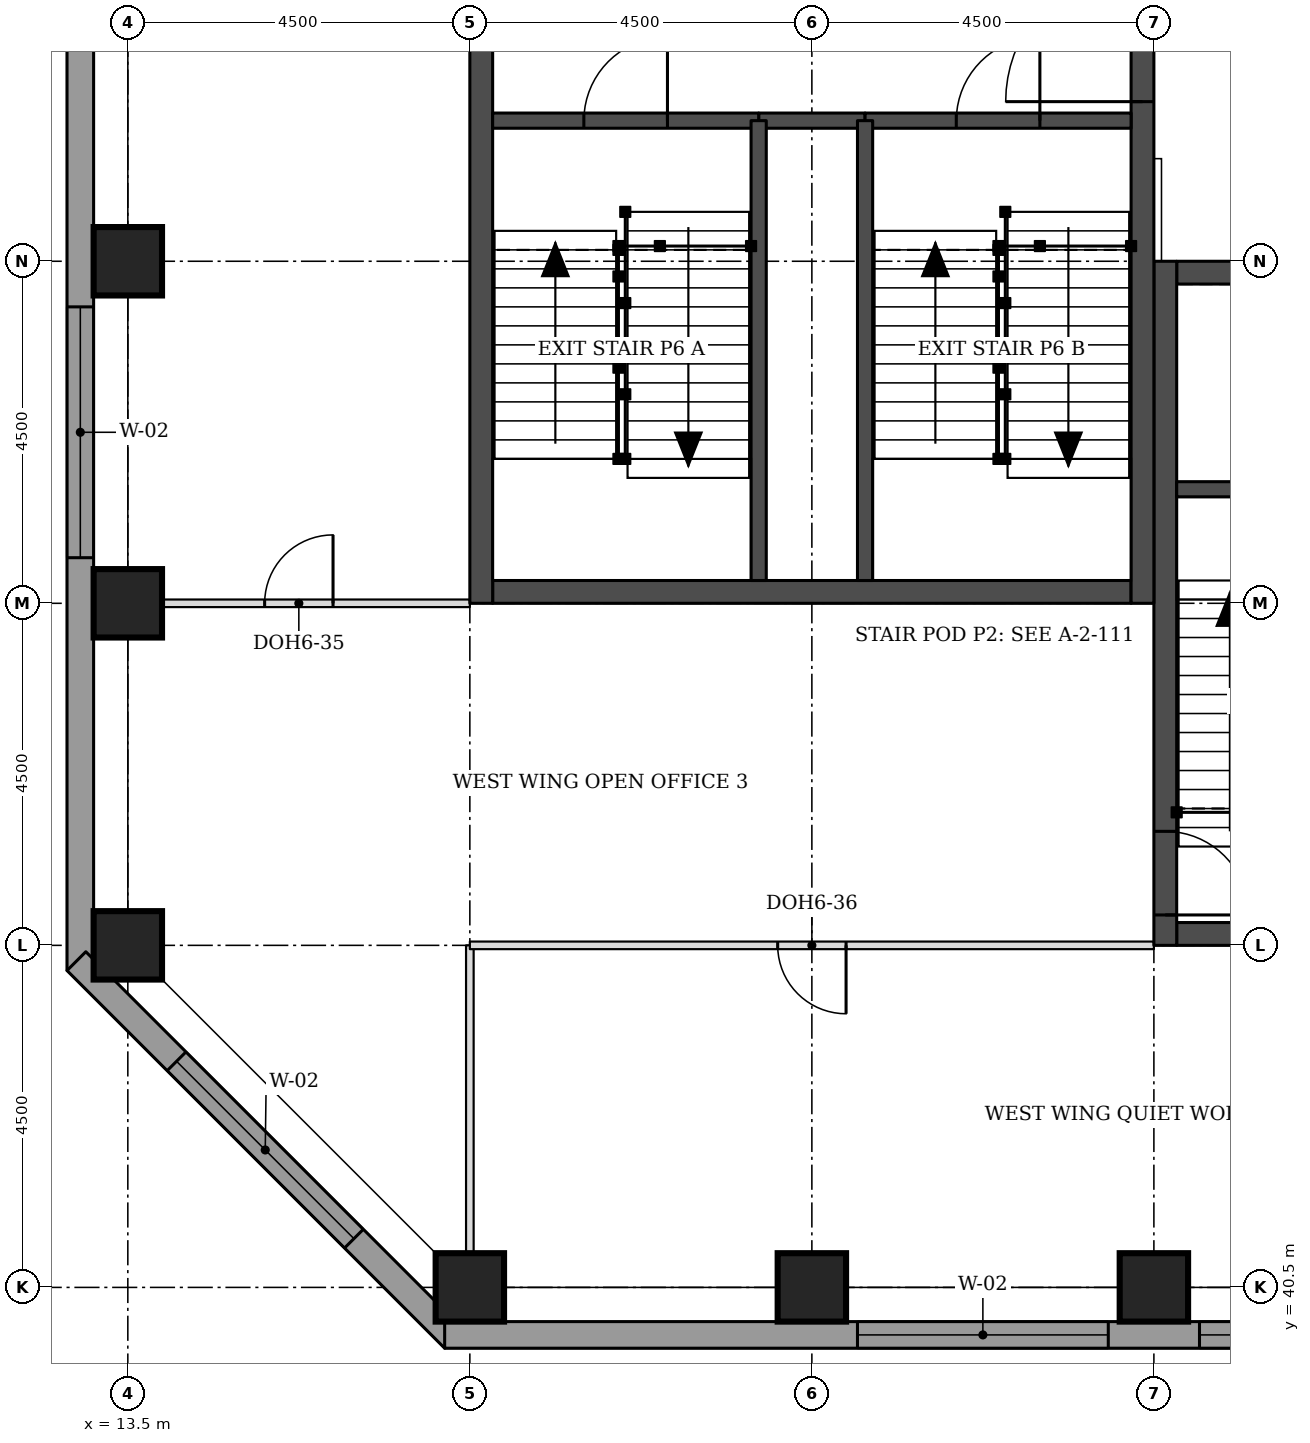
"""IFC4 building model, lengths in metres.
Left out: names, types, materials, properties, quantities, classifications, styles, units other than length and angle.
Written with IfcOpenShell. Run it as: python <this file> out.ifc"""

import sys

from ifc_helpers import new_model, si_unit, direction, frame, frame_2d, origin, origin_2d, place, context, subcontext, project, spatial, rectangle, extrude, element, fill, save


model = new_model("IFC4")
c1 = context("Model", 3, precision=1e-05, world=origin(), true_north=direction((0.0, 1.0)))
c2 = subcontext(c1, "Body", "Model", "MODEL_VIEW")
j1 = project(units=[si_unit("LENGTHUNIT", "METRE"), si_unit("PLANEANGLEUNIT", "RADIAN")], contexts=[c1])
p1 = place(None, origin())
s1 = spatial("IfcSite", under=j1, at=p1, CompositionType="ELEMENT")
p2 = place(p1, origin())
s2 = spatial("IfcBuilding", under=s1, at=p2, CompositionType="ELEMENT")
p3 = place(p2, frame((0.0, 0.0, 184.7)))
s3 = spatial("IfcBuildingStorey", under=s2, at=p3, CompositionType="ELEMENT", Elevation=184.7)
for number, where, z_axis, x_axis in (
    (1, (18.0, 40.5, 0.0), (0.0, 0.0, 1.0), (1.0, 0.0, 0.0)),
    (2, (22.5, 40.5, 0.0), (0.0, 0.0, 1.0), (1.0, 0.0, 0.0)),
    (3, (27.0, 40.5, 0.0), (0.0, 0.0, 1.0), (1.0, 0.0, 0.0)),
    (4, (13.5, 45.0, 0.0), (0.0, 0.0, 1.0), (1.0, 0.0, 0.0)),
    (5, (13.5, 49.5, 0.0), (0.0, 0.0, 1.0), (1.0, 0.0, 0.0)),
    (6, (13.5, 54.0, 0.0), (0.0, 0.0, 1.0), (1.0, 0.0, 0.0)),
):
    element("IfcColumn", number, at=place(p3, frame(where, z_axis=z_axis, x_axis=x_axis)), inside=s3, PredefinedType="COLUMN", context=c2, shape_type="SweptSolid", body=[
        extrude(rectangle(XDim=0.9, YDim=0.9, at=origin_2d()), origin(), (0.0, 0.0, 1.0), 3.7),
    ])
p4 = place(p3, frame((27.3, 45.15, 0.0), z_axis=(0.0, 0.0, 1.0), x_axis=(1.0, 0.0, 0.0)))
e7 = element("IfcWall", 7, at=p4, inside=s3, PredefinedType="SHEAR", context=c2, shape_type="SweptSolid", body=[
    extrude(rectangle(XDim=8.4, YDim=0.3, at=frame_2d((4.2, 0.0))), origin(), (0.0, 0.0, 1.0), 3.7),
])
p5 = place(p4, frame((5.2, 0.0, 0.0)))
e8 = element("IfcOpeningElement", 8, at=p5, cuts=e7, PredefinedType="OPENING", context=c2, shape_type="SweptSolid", body=[
    extrude(rectangle(XDim=1.0, YDim=2.1, at=frame_2d((0.5, 1.05))), frame((0.0, 0.16, 0.0), z_axis=(0.0, -1.0, 0.0), x_axis=(1.0, 0.0, 0.0)), (0.0, 0.0, 1.0), 0.32),
])
p6 = place(p3, frame((27.3, 53.85, 0.0), z_axis=(0.0, 0.0, 1.0), x_axis=(1.0, 0.0, 0.0)))
e9 = element("IfcWall", 9, at=p6, inside=s3, PredefinedType="SHEAR", context=c2, shape_type="SweptSolid", body=[
    extrude(rectangle(XDim=8.4, YDim=0.3, at=frame_2d((4.2, 0.0))), origin(), (0.0, 0.0, 1.0), 3.7),
])
p7 = place(p6, frame((6.4, 0.0, 0.0)))
e10 = element("IfcOpeningElement", 10, at=p7, cuts=e9, PredefinedType="OPENING", context=c2, shape_type="SweptSolid", body=[
    extrude(rectangle(XDim=1.1, YDim=2.1, at=frame_2d((0.55, 1.05))), frame((0.0, 0.16, 0.0), z_axis=(0.0, -1.0, 0.0), x_axis=(1.0, 0.0, 0.0)), (0.0, 0.0, 1.0), 0.32),
])
p8 = place(p3, frame((27.15, 45.0, 0.0), z_axis=(0.0, 0.0, 1.0), x_axis=(0.0, 1.0, 0.0)))
e11 = element("IfcWall", 11, at=p8, inside=s3, PredefinedType="SHEAR", context=c2, shape_type="SweptSolid", body=[
    extrude(rectangle(XDim=9.0, YDim=0.3, at=frame_2d((4.5, 0.0))), origin(), (0.0, 0.0, 1.0), 3.7),
])
p9 = place(p8, frame((0.4, 0.0, 0.0)))
e12 = element("IfcOpeningElement", 12, at=p9, cuts=e11, PredefinedType="OPENING", context=c2, shape_type="SweptSolid", body=[
    extrude(rectangle(XDim=1.1, YDim=2.1, at=frame_2d((0.55, 1.05))), frame((0.0, 0.16, 0.0), z_axis=(0.0, -1.0, 0.0), x_axis=(1.0, 0.0, 0.0)), (0.0, 0.0, 1.0), 0.32),
])
p10 = place(p3, frame((18.3, 49.65, 0.0), z_axis=(0.0, 0.0, 1.0), x_axis=(1.0, 0.0, 0.0)))
e13 = element("IfcWall", 13, at=p10, inside=s3, PredefinedType="SHEAR", context=c2, shape_type="SweptSolid", body=[
    extrude(rectangle(XDim=8.4, YDim=0.3, at=frame_2d((4.2, 0.0))), origin(), (0.0, 0.0, 1.0), 3.7),
])
p11 = place(p3, frame((18.15, 49.5, 0.0), z_axis=(0.0, 0.0, 1.0), x_axis=(0.0, 1.0, 0.0)))
e14 = element("IfcWall", 14, at=p11, inside=s3, PredefinedType="SHEAR", context=c2, shape_type="SweptSolid", body=[
    extrude(rectangle(XDim=9.0, YDim=0.3, at=frame_2d((4.5, 0.0))), origin(), (0.0, 0.0, 1.0), 3.7),
])
p12 = place(p3, frame((26.85, 49.5, 0.0), z_axis=(0.0, 0.0, 1.0), x_axis=(0.0, 1.0, 0.0)))
e15 = element("IfcWall", 15, at=p12, inside=s3, PredefinedType="SHEAR", context=c2, shape_type="SweptSolid", body=[
    extrude(rectangle(XDim=9.0, YDim=0.3, at=frame_2d((4.5, 0.0))), origin(), (0.0, 0.0, 1.0), 3.7),
])
p13 = place(p12, frame((6.6, 0.0, 0.0)))
e16 = element("IfcOpeningElement", 16, at=p13, cuts=e15, PredefinedType="OPENING", context=c2, shape_type="SweptSolid", body=[
    extrude(rectangle(XDim=1.8, YDim=2.1, at=frame_2d((0.9, 1.05))), frame((0.0, 0.16, 0.0), z_axis=(0.0, -1.0, 0.0), x_axis=(1.0, 0.0, 0.0)), (0.0, 0.0, 1.0), 0.32),
])
p14 = place(p3, frame((12.875, 58.831, 0.0), z_axis=(0.0, 0.0, 1.0), x_axis=(0.0, -1.0, 0.0)))
e17 = element("IfcWall", 17, at=p14, inside=s3, PredefinedType="STANDARD", context=c2, shape_type="SweptSolid", body=[
    extrude(rectangle(XDim=14.163, YDim=0.35, at=frame_2d((7.081, 0.0))), origin(), (0.0, 0.0, 1.0), 3.525),
])
p15 = place(p14, frame((5.431, 0.0, 0.9)))
e18 = element("IfcOpeningElement", 18, at=p15, cuts=e17, PredefinedType="OPENING", context=c2, shape_type="SweptSolid", body=[
    extrude(rectangle(XDim=3.3, YDim=1.9, at=frame_2d((1.65, 0.95))), frame((0.0, 0.185, 0.0), z_axis=(0.0, -1.0, 0.0), x_axis=(1.0, 0.0, 0.0)), (0.0, 0.0, 1.0), 0.37),
])
p16 = place(p3, frame((12.824, 44.792, 0.0), z_axis=(0.0, 0.0, 1.0), x_axis=(0.707106781187, -0.707106781187, 0.0)))
e19 = element("IfcWall", 19, at=p16, inside=s3, PredefinedType="STANDARD", context=c2, shape_type="SweptSolid", body=[
    extrude(rectangle(XDim=7.027, YDim=0.35, at=frame_2d((3.513, 0.0))), origin(), (0.0, 0.0, 1.0), 3.525),
])
p17 = place(p16, frame((1.863, 0.0, 0.9)))
e20 = element("IfcOpeningElement", 20, at=p17, cuts=e19, PredefinedType="OPENING", context=c2, shape_type="SweptSolid", body=[
    extrude(rectangle(XDim=3.3, YDim=1.9, at=frame_2d((1.65, 0.95))), frame((0.0, 0.185, 0.0), z_axis=(0.0, -1.0, 0.0), x_axis=(1.0, 0.0, 0.0)), (0.0, 0.0, 1.0), 0.37),
])
p18 = place(p3, frame((17.669, 39.875, 0.0), z_axis=(0.0, 0.0, 1.0), x_axis=(1.0, 0.0, 0.0)))
e21 = element("IfcWall", 21, at=p18, inside=s3, PredefinedType="STANDARD", context=c2, shape_type="SweptSolid", body=[
    extrude(rectangle(XDim=18.331, YDim=0.35, at=frame_2d((9.166, 0.0))), origin(), (0.0, 0.0, 1.0), 3.525),
])
p19 = place(p18, frame((5.431, 0.0, 0.9)))
e22 = element("IfcOpeningElement", 22, at=p19, cuts=e21, PredefinedType="OPENING", context=c2, shape_type="SweptSolid", body=[
    extrude(rectangle(XDim=3.3, YDim=1.9, at=frame_2d((1.65, 0.95))), frame((0.0, 0.185, 0.0), z_axis=(0.0, -1.0, 0.0), x_axis=(1.0, 0.0, 0.0)), (0.0, 0.0, 1.0), 0.37),
])
p20 = place(p18, frame((9.931, 0.0, 0.9)))
e23 = element("IfcOpeningElement", 23, at=p20, cuts=e21, PredefinedType="OPENING", context=c2, shape_type="SweptSolid", body=[
    extrude(rectangle(XDim=3.3, YDim=1.9, at=frame_2d((1.65, 0.95))), frame((0.0, 0.185, 0.0), z_axis=(0.0, -1.0, 0.0), x_axis=(1.0, 0.0, 0.0)), (0.0, 0.0, 1.0), 0.37),
])
p21 = place(p3, frame((13.5, 49.5, 0.0), z_axis=(0.0, 0.0, 1.0), x_axis=(1.0, 0.0, 0.0)))
e24 = element("IfcWall", 24, at=p21, inside=s3, PredefinedType="PARTITIONING", context=c2, shape_type="SweptSolid", body=[
    extrude(rectangle(XDim=4.5, YDim=0.1, at=frame_2d((2.25, 0.0))), origin(), (0.0, 0.0, 1.0), 3.55),
])
p22 = place(p21, frame((1.8, 0.0, 0.0)))
e25 = element("IfcOpeningElement", 25, at=p22, cuts=e24, PredefinedType="OPENING", context=c2, shape_type="SweptSolid", body=[
    extrude(rectangle(XDim=0.9, YDim=2.1, at=frame_2d((0.45, 1.05))), frame((0.0, 0.06, 0.0), z_axis=(0.0, -1.0, 0.0), x_axis=(1.0, 0.0, 0.0)), (0.0, 0.0, 1.0), 0.12),
])
p23 = place(p3, frame((18.0, 40.5, 0.0), z_axis=(0.0, 0.0, 1.0), x_axis=(0.0, 1.0, 0.0)))
e26 = element("IfcWall", 26, at=p23, inside=s3, PredefinedType="PARTITIONING", context=c2, shape_type="SweptSolid", body=[
    extrude(rectangle(XDim=4.5, YDim=0.1, at=frame_2d((2.25, 0.0))), origin(), (0.0, 0.0, 1.0), 3.55),
])
p24 = place(p3, frame((18.0, 45.0, 0.0), z_axis=(0.0, 0.0, 1.0), x_axis=(1.0, 0.0, 0.0)))
e27 = element("IfcWall", 27, at=p24, inside=s3, PredefinedType="PARTITIONING", context=c2, shape_type="SweptSolid", body=[
    extrude(rectangle(XDim=9.0, YDim=0.1, at=frame_2d((4.5, 0.0))), origin(), (0.0, 0.0, 1.0), 2.55),
])
p25 = place(p24, frame((4.05, 0.0, 0.0)))
e28 = element("IfcOpeningElement", 28, at=p25, cuts=e27, PredefinedType="OPENING", context=c2, shape_type="SweptSolid", body=[
    extrude(rectangle(XDim=0.9, YDim=2.1, at=frame_2d((0.45, 1.05))), frame((0.0, 0.06, 0.0), z_axis=(0.0, -1.0, 0.0), x_axis=(1.0, 0.0, 0.0)), (0.0, 0.0, 1.0), 0.12),
])
p26 = place(p3, frame((27.3, 51.0, 0.0), z_axis=(0.0, 0.0, 1.0), x_axis=(1.0, 0.0, 0.0)))
e29 = element("IfcWall", 29, at=p26, inside=s3, PredefinedType="SOLIDWALL", context=c2, shape_type="SweptSolid", body=[
    extrude(rectangle(XDim=3.0, YDim=0.2, at=frame_2d((1.5, 0.0))), origin(), (0.0, 0.0, 1.0), 3.55),
])
p27 = place(p3, frame((21.8, 55.85, 0.0), z_axis=(0.0, 0.0, 1.0), x_axis=(1.0, 0.0, 0.0)))
e30 = element("IfcWall", 30, at=p27, inside=s3, PredefinedType="SOLIDWALL", context=c2, shape_type="SweptSolid", body=[
    extrude(rectangle(XDim=1.4, YDim=0.2, at=frame_2d((0.7, 0.0))), origin(), (0.0, 0.0, 1.0), 3.55),
])
p28 = place(p3, frame((18.3, 55.85, 0.0), z_axis=(0.0, 0.0, 1.0), x_axis=(1.0, 0.0, 0.0)))
e31 = element("IfcWall", 31, at=p28, inside=s3, PredefinedType="SOLIDWALL", context=c2, shape_type="SweptSolid", body=[
    extrude(rectangle(XDim=3.5, YDim=0.2, at=frame_2d((1.75, 0.0))), origin(), (0.0, 0.0, 1.0), 3.55),
])
p29 = place(p28, frame((1.2, 0.0, 0.0)))
e32 = element("IfcOpeningElement", 32, at=p29, cuts=e31, PredefinedType="OPENING", context=c2, shape_type="SweptSolid", body=[
    extrude(rectangle(XDim=1.1, YDim=2.1, at=frame_2d((0.55, 1.05))), frame((0.0, 0.11, 0.0), z_axis=(0.0, -1.0, 0.0), x_axis=(1.0, 0.0, 0.0)), (0.0, 0.0, 1.0), 0.22),
])
p30 = place(p3, frame((23.2, 55.85, 0.0), z_axis=(0.0, 0.0, 1.0), x_axis=(1.0, 0.0, 0.0)))
e33 = element("IfcWall", 33, at=p30, inside=s3, PredefinedType="SOLIDWALL", context=c2, shape_type="SweptSolid", body=[
    extrude(rectangle(XDim=3.5, YDim=0.2, at=frame_2d((1.75, 0.0))), origin(), (0.0, 0.0, 1.0), 3.55),
])
p31 = place(p30, frame((1.2, 0.0, 0.0)))
e34 = element("IfcOpeningElement", 34, at=p31, cuts=e33, PredefinedType="OPENING", context=c2, shape_type="SweptSolid", body=[
    extrude(rectangle(XDim=1.1, YDim=2.1, at=frame_2d((0.55, 1.05))), frame((0.0, 0.11, 0.0), z_axis=(0.0, -1.0, 0.0), x_axis=(1.0, 0.0, 0.0)), (0.0, 0.0, 1.0), 0.22),
])
for number, where, z_axis, x_axis in (
    (35, (21.8, 49.8, 0.0), (0.0, 0.0, 1.0), (0.0, 1.0, 0.0)),
    (36, (23.2, 49.8, 0.0), (0.0, 0.0, 1.0), (0.0, 1.0, 0.0)),
):
    element("IfcWall", number, at=place(p3, frame(where, z_axis=z_axis, x_axis=x_axis)), inside=s3, PredefinedType="SOLIDWALL", context=c2, shape_type="SweptSolid", body=[
        extrude(rectangle(XDim=6.05, YDim=0.2, at=frame_2d((3.025, 0.0))), origin(), (0.0, 0.0, 1.0), 3.55),
    ])
p32 = place(p15, origin())
e37 = element("IfcWindow", 37, at=p32, inside=s3, PartitioningType="SINGLE_PANEL", PredefinedType="WINDOW", context=c2, shape_type="SweptSolid", body=[
    extrude(rectangle(XDim=3.3, YDim=1.9, at=frame_2d((1.65, 0.95))), frame((0.0, 0.085, 0.0), z_axis=(0.0, -1.0, 0.0), x_axis=(1.0, 0.0, 0.0)), (0.0, 0.0, 1.0), 0.06),
])
fill(e18, e37)
p33 = place(p17, origin())
e38 = element("IfcWindow", 38, at=p33, inside=s3, PartitioningType="SINGLE_PANEL", PredefinedType="WINDOW", context=c2, shape_type="SweptSolid", body=[
    extrude(rectangle(XDim=3.3, YDim=1.9, at=frame_2d((1.65, 0.95))), frame((0.0, 0.085, 0.0), z_axis=(0.0, -1.0, 0.0), x_axis=(1.0, 0.0, 0.0)), (0.0, 0.0, 1.0), 0.06),
])
fill(e20, e38)
p34 = place(p19, origin())
e39 = element("IfcWindow", 39, at=p34, inside=s3, PartitioningType="SINGLE_PANEL", PredefinedType="WINDOW", context=c2, shape_type="SweptSolid", body=[
    extrude(rectangle(XDim=3.3, YDim=1.9, at=frame_2d((1.65, 0.95))), frame((0.0, 0.085, 0.0), z_axis=(0.0, -1.0, 0.0), x_axis=(1.0, 0.0, 0.0)), (0.0, 0.0, 1.0), 0.06),
])
fill(e22, e39)
p35 = place(p20, origin())
e40 = element("IfcWindow", 40, at=p35, inside=s3, PartitioningType="SINGLE_PANEL", PredefinedType="WINDOW", context=c2, shape_type="SweptSolid", body=[
    extrude(rectangle(XDim=3.3, YDim=1.9, at=frame_2d((1.65, 0.95))), frame((0.0, 0.085, 0.0), z_axis=(0.0, -1.0, 0.0), x_axis=(1.0, 0.0, 0.0)), (0.0, 0.0, 1.0), 0.06),
])
fill(e23, e40)
p36 = place(p22, origin())
e41 = element("IfcDoor", 41, at=p36, inside=s3, OperationType="SINGLE_SWING_RIGHT", PredefinedType="DOOR", context=c2, shape_type="SweptSolid", body=[
    extrude(rectangle(XDim=0.9, YDim=2.1, at=frame_2d((0.45, 1.05))), frame((0.0, 0.025, 0.0), z_axis=(0.0, -1.0, 0.0), x_axis=(1.0, 0.0, 0.0)), (0.0, 0.0, 1.0), 0.05),
])
fill(e25, e41)
p37 = place(p25, frame((0.9, 0.0, 0.0), z_axis=(0.0, 0.0, 1.0), x_axis=(-1.0, 0.0, 0.0)))
e42 = element("IfcDoor", 42, at=p37, inside=s3, OperationType="SINGLE_SWING_LEFT", PredefinedType="DOOR", context=c2, shape_type="SweptSolid", body=[
    extrude(rectangle(XDim=0.9, YDim=2.1, at=frame_2d((0.45, 1.05))), frame((0.0, 0.025, 0.0), z_axis=(0.0, -1.0, 0.0), x_axis=(1.0, 0.0, 0.0)), (0.0, 0.0, 1.0), 0.05),
])
fill(e28, e42)
p38 = place(p9, frame((1.1, 0.0, 0.0), z_axis=(0.0, 0.0, 1.0), x_axis=(-1.0, 0.0, 0.0)))
e43 = element("IfcDoor", 43, at=p38, inside=s3, OperationType="SINGLE_SWING_RIGHT", PredefinedType="DOOR", context=c2, shape_type="SweptSolid", body=[
    extrude(rectangle(XDim=1.1, YDim=2.1, at=frame_2d((0.55, 1.05))), frame((0.0, 0.025, 0.0), z_axis=(0.0, -1.0, 0.0), x_axis=(1.0, 0.0, 0.0)), (0.0, 0.0, 1.0), 0.05),
])
fill(e12, e43)
p39 = place(p29, origin())
e44 = element("IfcDoor", 44, at=p39, inside=s3, OperationType="SINGLE_SWING_RIGHT", PredefinedType="DOOR", context=c2, shape_type="SweptSolid", body=[
    extrude(rectangle(XDim=1.1, YDim=2.1, at=frame_2d((0.55, 1.05))), frame((0.0, 0.025, 0.0), z_axis=(0.0, -1.0, 0.0), x_axis=(1.0, 0.0, 0.0)), (0.0, 0.0, 1.0), 0.05),
])
fill(e32, e44)
p40 = place(p31, origin())
e45 = element("IfcDoor", 45, at=p40, inside=s3, OperationType="SINGLE_SWING_RIGHT", PredefinedType="DOOR", context=c2, shape_type="SweptSolid", body=[
    extrude(rectangle(XDim=1.1, YDim=2.1, at=frame_2d((0.55, 1.05))), frame((0.0, 0.025, 0.0), z_axis=(0.0, -1.0, 0.0), x_axis=(1.0, 0.0, 0.0)), (0.0, 0.0, 1.0), 0.05),
])
fill(e34, e45)
p41 = place(p13, origin())
e46 = element("IfcDoor", 46, at=p41, inside=s3, OperationType="SINGLE_SWING_LEFT", PredefinedType="DOOR", context=c2, shape_type="SweptSolid", body=[
    extrude(rectangle(XDim=1.8, YDim=2.1, at=frame_2d((0.9, 1.05))), frame((0.0, 0.025, 0.0), z_axis=(0.0, -1.0, 0.0), x_axis=(1.0, 0.0, 0.0)), (0.0, 0.0, 1.0), 0.05),
])
fill(e16, e46)
save(model, sys.argv[1])
